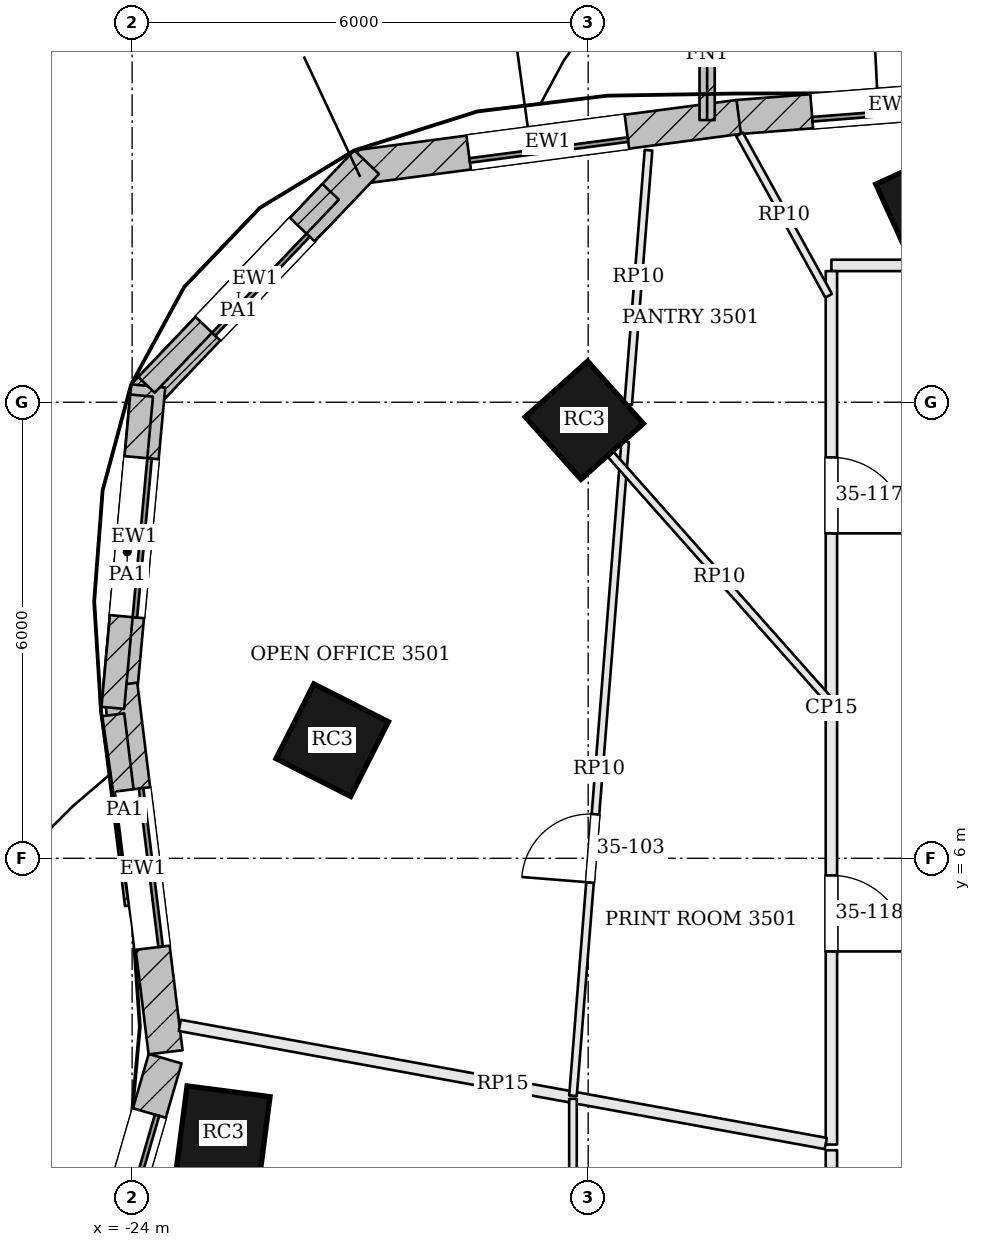
"""IFC4 building model, lengths in metres.
Left out: names, types, materials, properties, quantities, classifications, styles, units other than length and angle.
Written with IfcOpenShell. Run it as: python <this file> out.ifc"""

import sys

from ifc_helpers import new_model, si_unit, direction, frame, frame_2d, origin, origin_2d, place, context, subcontext, project, spatial, rectangle, extrude, element, fill, save


model = new_model("IFC4")
c1 = context("Model", 3, precision=1e-05, world=origin(), true_north=direction((0.0, 1.0)))
c2 = subcontext(c1, "Body", "Model", "MODEL_VIEW")
j1 = project(units=[si_unit("LENGTHUNIT", "METRE"), si_unit("PLANEANGLEUNIT", "RADIAN")], contexts=[c1])
p1 = place(None, origin())
s1 = spatial("IfcSite", under=j1, at=p1, CompositionType="ELEMENT")
p2 = place(p1, origin())
s2 = spatial("IfcBuilding", under=s1, at=p2, CompositionType="ELEMENT")
p3 = place(p2, frame((0.0, 0.0, 146.1)))
s3 = spatial("IfcBuildingStorey", under=s2, at=p3, CompositionType="ELEMENT", Elevation=146.1)
for number, where, z_axis, x_axis in (
    (1, (-13.487, 14.596, 0.0), (0.0, 0.0, 1.0), (-0.91, -0.415, 0.0)),
    (2, (-18.051, 11.763, 0.0), (0.0, 0.0, 1.0), (-0.746, -0.666, 0.0)),
    (3, (-21.367, 7.554, 0.0), (0.0, 0.0, 1.0), (-0.452, -0.892, 0.0)),
    (4, (-22.802, 2.389, 0.0), (0.0, 0.0, 1.0), (-0.129, -0.992, 0.0)),
):
    element("IfcColumn", number, at=place(p3, frame(where, z_axis=z_axis, x_axis=x_axis)), inside=s3, PredefinedType="COLUMN", context=c2, shape_type="SweptSolid", body=[
        extrude(rectangle(XDim=1.1, YDim=1.1, at=origin_2d()), origin(), (0.0, 0.0, 1.0), 3.9),
    ])
p4 = place(p3, frame((-11.995, 16.067, 0.0), z_axis=(0.0, 0.0, 1.0), x_axis=(-0.996967993416, -0.077812724559, 0.0)))
e5 = element("IfcWall", 5, at=p4, inside=s3, PredefinedType="SOLIDWALL", context=c2, shape_type="SweptSolid", body=[
    extrude(rectangle(XDim=4.047, YDim=0.45, at=frame_2d((2.024, 0.0))), origin(), (0.0, 0.0, 1.0), 3.7),
])
p5 = place(p4, frame((0.974, 0.0, 0.9)))
e6 = element("IfcOpeningElement", 6, at=p5, cuts=e5, PredefinedType="OPENING", context=c2, shape_type="SweptSolid", body=[
    extrude(rectangle(XDim=2.1, YDim=2.3, at=frame_2d((1.05, 1.15))), frame((0.0, 0.235, 0.0), z_axis=(0.0, -1.0, 0.0), x_axis=(1.0, 0.0, 0.0)), (0.0, 0.0, 1.0), 0.47),
])
p6 = place(p3, frame((-16.019, 15.753, 0.0), z_axis=(0.0, 0.0, 1.0), x_axis=(-0.991409967396, -0.130790965086, 0.0)))
e7 = element("IfcWall", 7, at=p6, inside=s3, PredefinedType="SOLIDWALL", context=c2, shape_type="SweptSolid", body=[
    extrude(rectangle(XDim=5.068, YDim=0.45, at=frame_2d((2.534, 0.0))), origin(), (0.0, 0.0, 1.0), 3.7),
])
p7 = place(p6, frame((1.484, 0.0, 0.9)))
e8 = element("IfcOpeningElement", 8, at=p7, cuts=e7, PredefinedType="OPENING", context=c2, shape_type="SweptSolid", body=[
    extrude(rectangle(XDim=2.1, YDim=2.3, at=frame_2d((1.05, 1.15))), frame((0.0, 0.235, 0.0), z_axis=(0.0, -1.0, 0.0), x_axis=(1.0, 0.0, 0.0)), (0.0, 0.0, 1.0), 0.47),
])
p8 = place(p3, frame((-20.914, 15.158, 0.0), z_axis=(0.0, 0.0, 1.0), x_axis=(-0.690057851873, -0.723754213161, 0.0)))
e9 = element("IfcWall", 9, at=p8, inside=s3, PredefinedType="SOLIDWALL", context=c2, shape_type="SweptSolid", body=[
    extrude(rectangle(XDim=4.253, YDim=0.45, at=frame_2d((2.126, 0.0))), origin(), (0.0, 0.0, 1.0), 3.7),
])
p9 = place(p8, frame((1.227, 0.0, 0.9)))
e10 = element("IfcOpeningElement", 10, at=p9, cuts=e9, PredefinedType="OPENING", context=c2, shape_type="SweptSolid", body=[
    extrude(rectangle(XDim=1.8, YDim=2.3, at=frame_2d((0.9, 1.15))), frame((0.0, 0.235, 0.0), z_axis=(0.0, -1.0, 0.0), x_axis=(1.0, 0.0, 0.0)), (0.0, 0.0, 1.0), 0.47),
])
p10 = place(p3, frame((-23.788, 12.214, 0.0), z_axis=(0.0, 0.0, 1.0), x_axis=(-0.091885237351, -0.995769603451, 0.0)))
e11 = element("IfcWall", 11, at=p10, inside=s3, PredefinedType="SOLIDWALL", context=c2, shape_type="SweptSolid", body=[
    extrude(rectangle(XDim=3.996, YDim=0.45, at=frame_2d((1.998, 0.0))), origin(), (0.0, 0.0, 1.0), 3.7),
])
p11 = place(p10, frame((0.948, 0.0, 0.9)))
e12 = element("IfcOpeningElement", 12, at=p11, cuts=e11, PredefinedType="OPENING", context=c2, shape_type="SweptSolid", body=[
    extrude(rectangle(XDim=2.1, YDim=2.3, at=frame_2d((1.05, 1.15))), frame((0.0, 0.235, 0.0), z_axis=(0.0, -1.0, 0.0), x_axis=(1.0, 0.0, 0.0)), (0.0, 0.0, 1.0), 0.47),
])
p12 = place(p3, frame((-24.156, 8.283, 0.0), z_axis=(0.0, 0.0, 1.0), x_axis=(0.122319995681, -0.992490714645, 0.0)))
e13 = element("IfcWall", 13, at=p12, inside=s3, PredefinedType="SOLIDWALL", context=c2, shape_type="SweptSolid", body=[
    extrude(rectangle(XDim=4.872, YDim=0.45, at=frame_2d((2.436, 0.0))), origin(), (0.0, 0.0, 1.0), 3.7),
])
p13 = place(p12, frame((1.386, 0.0, 0.9)))
e14 = element("IfcOpeningElement", 14, at=p13, cuts=e13, PredefinedType="OPENING", context=c2, shape_type="SweptSolid", body=[
    extrude(rectangle(XDim=2.1, YDim=2.3, at=frame_2d((1.05, 1.15))), frame((0.0, 0.235, 0.0), z_axis=(0.0, -1.0, 0.0), x_axis=(1.0, 0.0, 0.0)), (0.0, 0.0, 1.0), 0.47),
])
p14 = place(p3, frame((-23.565, 3.364, 0.0), z_axis=(0.0, 0.0, 1.0), x_axis=(-0.279148198653, -0.960248032119, 0.0)))
e15 = element("IfcWall", 15, at=p14, inside=s3, PredefinedType="SOLIDWALL", context=c2, shape_type="SweptSolid", body=[
    extrude(rectangle(XDim=3.588, YDim=0.45, at=frame_2d((1.794, 0.0))), origin(), (0.0, 0.0, 1.0), 3.7),
])
p15 = place(p14, frame((0.744, 0.0, 0.9)))
e16 = element("IfcOpeningElement", 16, at=p15, cuts=e15, PredefinedType="OPENING", context=c2, shape_type="SweptSolid", body=[
    extrude(rectangle(XDim=2.1, YDim=2.3, at=frame_2d((1.05, 1.15))), frame((0.0, 0.235, 0.0), z_axis=(0.0, -1.0, 0.0), x_axis=(1.0, 0.0, 0.0)), (0.0, 0.0, 1.0), 0.47),
])
p16 = place(p3, frame((-16.435, 15.712, 0.0), z_axis=(0.0, 0.0, 1.0), x_axis=(0.000279017846, 0.999999961075, 0.0)))
e17 = element("IfcWall", 17, at=p16, inside=s3, PredefinedType="SOLIDWALL", context=c2, shape_type="SweptSolid", body=[
    extrude(rectangle(XDim=1.75, YDim=0.2, at=frame_2d((0.875, 0.0))), origin(), (0.0, 0.0, 1.0), 3.7),
])
p17 = place(p3, frame((-21.388, 14.769, 3.9), z_axis=(0.0, 0.0, 1.0), x_axis=(-0.690144808601, -0.723671294969, 0.0)))
e18 = element("IfcWall", 18, at=p17, inside=s3, PredefinedType="PARAPET", context=c2, shape_type="SweptSolid", body=[
    extrude(rectangle(XDim=3.51, YDim=0.3, at=frame_2d((1.755, 0.0))), origin(), (0.0, 0.0, 1.0), 1.1),
])
p18 = place(p3, frame((-23.875, 12.087, 3.9), z_axis=(0.0, 0.0, 1.0), x_axis=(-0.091842900475, -0.995773509204, 0.0)))
e19 = element("IfcWall", 19, at=p18, inside=s3, PredefinedType="PARAPET", context=c2, shape_type="SweptSolid", body=[
    extrude(rectangle(XDim=4.125, YDim=0.3, at=frame_2d((2.063, 0.0))), origin(), (0.0, 0.0, 1.0), 1.1),
])
p19 = place(p3, frame((-24.252, 7.887, 3.9), z_axis=(0.0, 0.0, 1.0), x_axis=(0.122315432018, -0.992491277085, 0.0)))
e20 = element("IfcWall", 20, at=p19, inside=s3, PredefinedType="PARAPET", context=c2, shape_type="SweptSolid", body=[
    extrude(rectangle(XDim=2.517, YDim=0.3, at=frame_2d((1.258, 0.0))), origin(), (0.0, 0.0, 1.0), 1.1),
])
p20 = place(p3, frame((2.36, 13.8, 0.0), z_axis=(0.0, 0.0, 1.0), x_axis=(-1.0, 0.0, 0.0)))
e21 = element("IfcWall", 21, at=p20, inside=s3, PredefinedType="PARTITIONING", context=c2, shape_type="SweptSolid", body=[
    extrude(rectangle(XDim=17.16, YDim=0.15, at=frame_2d((8.58, 0.0))), origin(), (0.0, 0.0, 1.0), 3.198),
])
p21 = place(p20, frame((4.303, 0.0, 0.0)))
e22 = element("IfcOpeningElement", 22, at=p21, cuts=e21, PredefinedType="OPENING", context=c2, shape_type="SweptSolid", body=[
    extrude(rectangle(XDim=1.8, YDim=2.1, at=frame_2d((0.9, 1.05))), frame((0.0, 0.085, 0.0), z_axis=(0.0, -1.0, 0.0), x_axis=(1.0, 0.0, 0.0)), (0.0, 0.0, 1.0), 0.17),
])
p22 = place(p20, frame((13.553, 0.0, 0.0)))
e23 = element("IfcOpeningElement", 23, at=p22, cuts=e21, PredefinedType="OPENING", context=c2, shape_type="SweptSolid", body=[
    extrude(rectangle(XDim=1.0, YDim=2.4, at=frame_2d((0.5, 1.2))), frame((0.0, 0.085, 0.0), z_axis=(0.0, -1.0, 0.0), x_axis=(1.0, 0.0, 0.0)), (0.0, 0.0, 1.0), 0.17),
])
p23 = place(p3, frame((-14.8, 13.725, 0.0), z_axis=(0.0, 0.0, 1.0), x_axis=(0.0, -1.0, 0.0)))
e24 = element("IfcWall", 24, at=p23, inside=s3, PredefinedType="PARTITIONING", context=c2, shape_type="SweptSolid", body=[
    extrude(rectangle(XDim=11.491, YDim=0.15, at=frame_2d((5.745, 0.0))), origin(), (0.0, 0.0, 1.0), 3.198),
])
p24 = place(p23, frame((2.45, 0.0, 0.0)))
e25 = element("IfcOpeningElement", 25, at=p24, cuts=e24, PredefinedType="OPENING", context=c2, shape_type="SweptSolid", body=[
    extrude(rectangle(XDim=1.0, YDim=2.1, at=frame_2d((0.5, 1.05))), frame((0.0, 0.085, 0.0), z_axis=(0.0, -1.0, 0.0), x_axis=(1.0, 0.0, 0.0)), (0.0, 0.0, 1.0), 0.17),
])
p25 = place(p23, frame((7.95, 0.0, 0.0)))
e26 = element("IfcOpeningElement", 26, at=p25, cuts=e24, PredefinedType="OPENING", context=c2, shape_type="SweptSolid", body=[
    extrude(rectangle(XDim=1.0, YDim=2.1, at=frame_2d((0.5, 1.05))), frame((0.0, 0.085, 0.0), z_axis=(0.0, -1.0, 0.0), x_axis=(1.0, 0.0, 0.0)), (0.0, 0.0, 1.0), 0.17),
])
p26 = place(p3, frame((-23.373, 3.802, 0.0), z_axis=(0.0, 0.0, 1.0), x_axis=(0.983692652106, -0.179857627561, 0.0)))
e27 = element("IfcWall", 27, at=p26, inside=s3, PredefinedType="PARTITIONING", context=c2, shape_type="SweptSolid", body=[
    extrude(rectangle(XDim=8.64, YDim=0.15, at=frame_2d((4.32, 0.0))), origin(), (0.0, 0.0, 1.0), 3.234),
])
p27 = place(p3, frame((-14.8, 2.159, 0.0), z_axis=(0.0, 0.0, 1.0), x_axis=(0.0, -1.0, 0.0)))
e28 = element("IfcWall", 28, at=p27, inside=s3, PredefinedType="PARTITIONING", context=c2, shape_type="SweptSolid", body=[
    extrude(rectangle(XDim=6.959, YDim=0.15, at=frame_2d((3.479, 0.0))), origin(), (0.0, 0.0, 1.0), 3.198),
])
p28 = place(p27, frame((2.03, 0.0, 0.0)))
e29 = element("IfcOpeningElement", 29, at=p28, cuts=e28, PredefinedType="OPENING", context=c2, shape_type="SweptSolid", body=[
    extrude(rectangle(XDim=1.8, YDim=2.1, at=frame_2d((0.9, 1.05))), frame((0.0, 0.085, 0.0), z_axis=(0.0, -1.0, 0.0), x_axis=(1.0, 0.0, 0.0)), (0.0, 0.0, 1.0), 0.17),
])
p29 = place(p3, frame((-18.2, 2.876, 0.0), z_axis=(0.0, 0.0, 1.0), x_axis=(0.079629418232, 0.99682453609, 0.0)))
e30 = element("IfcWall", 30, at=p29, inside=s3, PredefinedType="PARTITIONING", context=c2, shape_type="SweptSolid", body=[
    extrude(rectangle(XDim=8.631, YDim=0.1, at=frame_2d((4.315, 0.0))), origin(), (0.0, 0.0, 1.0), 3.184),
])
p30 = place(p29, frame((2.815, 0.0, 0.0)))
e31 = element("IfcOpeningElement", 31, at=p30, cuts=e30, PredefinedType="OPENING", context=c2, shape_type="SweptSolid", body=[
    extrude(rectangle(XDim=0.9, YDim=2.1, at=frame_2d((0.45, 1.05))), frame((0.0, 0.06, 0.0), z_axis=(0.0, -1.0, 0.0), x_axis=(1.0, 0.0, 0.0)), (0.0, 0.0, 1.0), 0.12),
])
p31 = place(p3, frame((-17.473, 11.972, 0.0), z_axis=(0.0, 0.0, 1.0), x_axis=(0.079641059306, 0.996823606097, 0.0)))
e32 = element("IfcWall", 32, at=p31, inside=s3, PredefinedType="PARTITIONING", context=c2, shape_type="SweptSolid", body=[
    extrude(rectangle(XDim=3.354, YDim=0.1, at=frame_2d((1.677, 0.0))), origin(), (0.0, 0.0, 1.0), 3.184),
])
p32 = place(p3, frame((-14.836, 13.401, 0.0), z_axis=(0.0, 0.0, 1.0), x_axis=(-0.483487187132, 0.875351437926, 0.0)))
e33 = element("IfcWall", 33, at=p32, inside=s3, PredefinedType="PARTITIONING", context=c2, shape_type="SweptSolid", body=[
    extrude(rectangle(XDim=2.425, YDim=0.1, at=frame_2d((1.212, 0.0))), origin(), (0.0, 0.0, 1.0), 3.184),
])
p33 = place(p3, frame((-14.85, 8.099, 0.0), z_axis=(0.0, 0.0, 1.0), x_axis=(-0.664003906353, 0.747729103585, 0.0)))
e34 = element("IfcWall", 34, at=p33, inside=s3, PredefinedType="PARTITIONING", context=c2, shape_type="SweptSolid", body=[
    extrude(rectangle(XDim=4.295, YDim=0.1, at=frame_2d((2.147, 0.0))), origin(), (0.0, 0.0, 1.0), 3.184),
])
p34 = place(p3, frame((-18.2, -8.15, 0.0), z_axis=(0.0, 0.0, 1.0), x_axis=(0.0, 1.0, 0.0)))
e35 = element("IfcWall", 35, at=p34, inside=s3, PredefinedType="PARTITIONING", context=c2, shape_type="SweptSolid", body=[
    extrude(rectangle(XDim=10.986, YDim=0.1, at=frame_2d((5.493, 0.0))), origin(), (0.0, 0.0, 1.0), 3.184),
])
p35 = place(p34, frame((6.864, 0.0, 0.0)))
e36 = element("IfcOpeningElement", 36, at=p35, cuts=e35, PredefinedType="OPENING", context=c2, shape_type="SweptSolid", body=[
    extrude(rectangle(XDim=1.0, YDim=2.1, at=frame_2d((0.5, 1.05))), frame((0.0, 0.06, 0.0), z_axis=(0.0, -1.0, 0.0), x_axis=(1.0, 0.0, 0.0)), (0.0, 0.0, 1.0), 0.12),
])
p36 = place(p5, origin())
e37 = element("IfcWindow", 37, at=p36, inside=s3, PartitioningType="SINGLE_PANEL", PredefinedType="WINDOW", context=c2, shape_type="SweptSolid", body=[
    extrude(rectangle(XDim=2.1, YDim=2.3, at=frame_2d((1.05, 1.15))), frame((0.0, 0.135, 0.0), z_axis=(0.0, -1.0, 0.0), x_axis=(1.0, 0.0, 0.0)), (0.0, 0.0, 1.0), 0.06),
])
fill(e6, e37)
p37 = place(p7, origin())
e38 = element("IfcWindow", 38, at=p37, inside=s3, PartitioningType="SINGLE_PANEL", PredefinedType="WINDOW", context=c2, shape_type="SweptSolid", body=[
    extrude(rectangle(XDim=2.1, YDim=2.3, at=frame_2d((1.05, 1.15))), frame((0.0, 0.135, 0.0), z_axis=(0.0, -1.0, 0.0), x_axis=(1.0, 0.0, 0.0)), (0.0, 0.0, 1.0), 0.06),
])
fill(e8, e38)
p38 = place(p9, origin())
e39 = element("IfcWindow", 39, at=p38, inside=s3, PartitioningType="SINGLE_PANEL", PredefinedType="WINDOW", context=c2, shape_type="SweptSolid", body=[
    extrude(rectangle(XDim=1.8, YDim=2.3, at=frame_2d((0.9, 1.15))), frame((0.0, 0.135, 0.0), z_axis=(0.0, -1.0, 0.0), x_axis=(1.0, 0.0, 0.0)), (0.0, 0.0, 1.0), 0.06),
])
fill(e10, e39)
p39 = place(p11, origin())
e40 = element("IfcWindow", 40, at=p39, inside=s3, PartitioningType="SINGLE_PANEL", PredefinedType="WINDOW", context=c2, shape_type="SweptSolid", body=[
    extrude(rectangle(XDim=2.1, YDim=2.3, at=frame_2d((1.05, 1.15))), frame((0.0, 0.135, 0.0), z_axis=(0.0, -1.0, 0.0), x_axis=(1.0, 0.0, 0.0)), (0.0, 0.0, 1.0), 0.06),
])
fill(e12, e40)
p40 = place(p13, origin())
e41 = element("IfcWindow", 41, at=p40, inside=s3, PartitioningType="SINGLE_PANEL", PredefinedType="WINDOW", context=c2, shape_type="SweptSolid", body=[
    extrude(rectangle(XDim=2.1, YDim=2.3, at=frame_2d((1.05, 1.15))), frame((0.0, 0.135, 0.0), z_axis=(0.0, -1.0, 0.0), x_axis=(1.0, 0.0, 0.0)), (0.0, 0.0, 1.0), 0.06),
])
fill(e14, e41)
p41 = place(p15, origin())
e42 = element("IfcWindow", 42, at=p41, inside=s3, PartitioningType="SINGLE_PANEL", PredefinedType="WINDOW", context=c2, shape_type="SweptSolid", body=[
    extrude(rectangle(XDim=2.1, YDim=2.3, at=frame_2d((1.05, 1.15))), frame((0.0, 0.135, 0.0), z_axis=(0.0, -1.0, 0.0), x_axis=(1.0, 0.0, 0.0)), (0.0, 0.0, 1.0), 0.06),
])
fill(e16, e42)
p42 = place(p30, origin())
e43 = element("IfcDoor", 43, at=p42, inside=s3, OperationType="SINGLE_SWING_LEFT", PredefinedType="DOOR", context=c2, shape_type="SweptSolid", body=[
    extrude(rectangle(XDim=0.9, YDim=2.1, at=frame_2d((0.45, 1.05))), frame((0.0, 0.025, 0.0), z_axis=(0.0, -1.0, 0.0), x_axis=(1.0, 0.0, 0.0)), (0.0, 0.0, 1.0), 0.05),
])
fill(e31, e43)
p43 = place(p24, origin())
e44 = element("IfcDoor", 44, at=p43, inside=s3, OperationType="SINGLE_SWING_RIGHT", PredefinedType="DOOR", context=c2, shape_type="SweptSolid", body=[
    extrude(rectangle(XDim=1.0, YDim=2.1, at=frame_2d((0.5, 1.05))), frame((0.0, 0.025, 0.0), z_axis=(0.0, -1.0, 0.0), x_axis=(1.0, 0.0, 0.0)), (0.0, 0.0, 1.0), 0.05),
])
fill(e25, e44)
p44 = place(p25, origin())
e45 = element("IfcDoor", 45, at=p44, inside=s3, OperationType="SINGLE_SWING_RIGHT", PredefinedType="DOOR", context=c2, shape_type="SweptSolid", body=[
    extrude(rectangle(XDim=1.0, YDim=2.1, at=frame_2d((0.5, 1.05))), frame((0.0, 0.025, 0.0), z_axis=(0.0, -1.0, 0.0), x_axis=(1.0, 0.0, 0.0)), (0.0, 0.0, 1.0), 0.05),
])
fill(e26, e45)
save(model, sys.argv[1])
